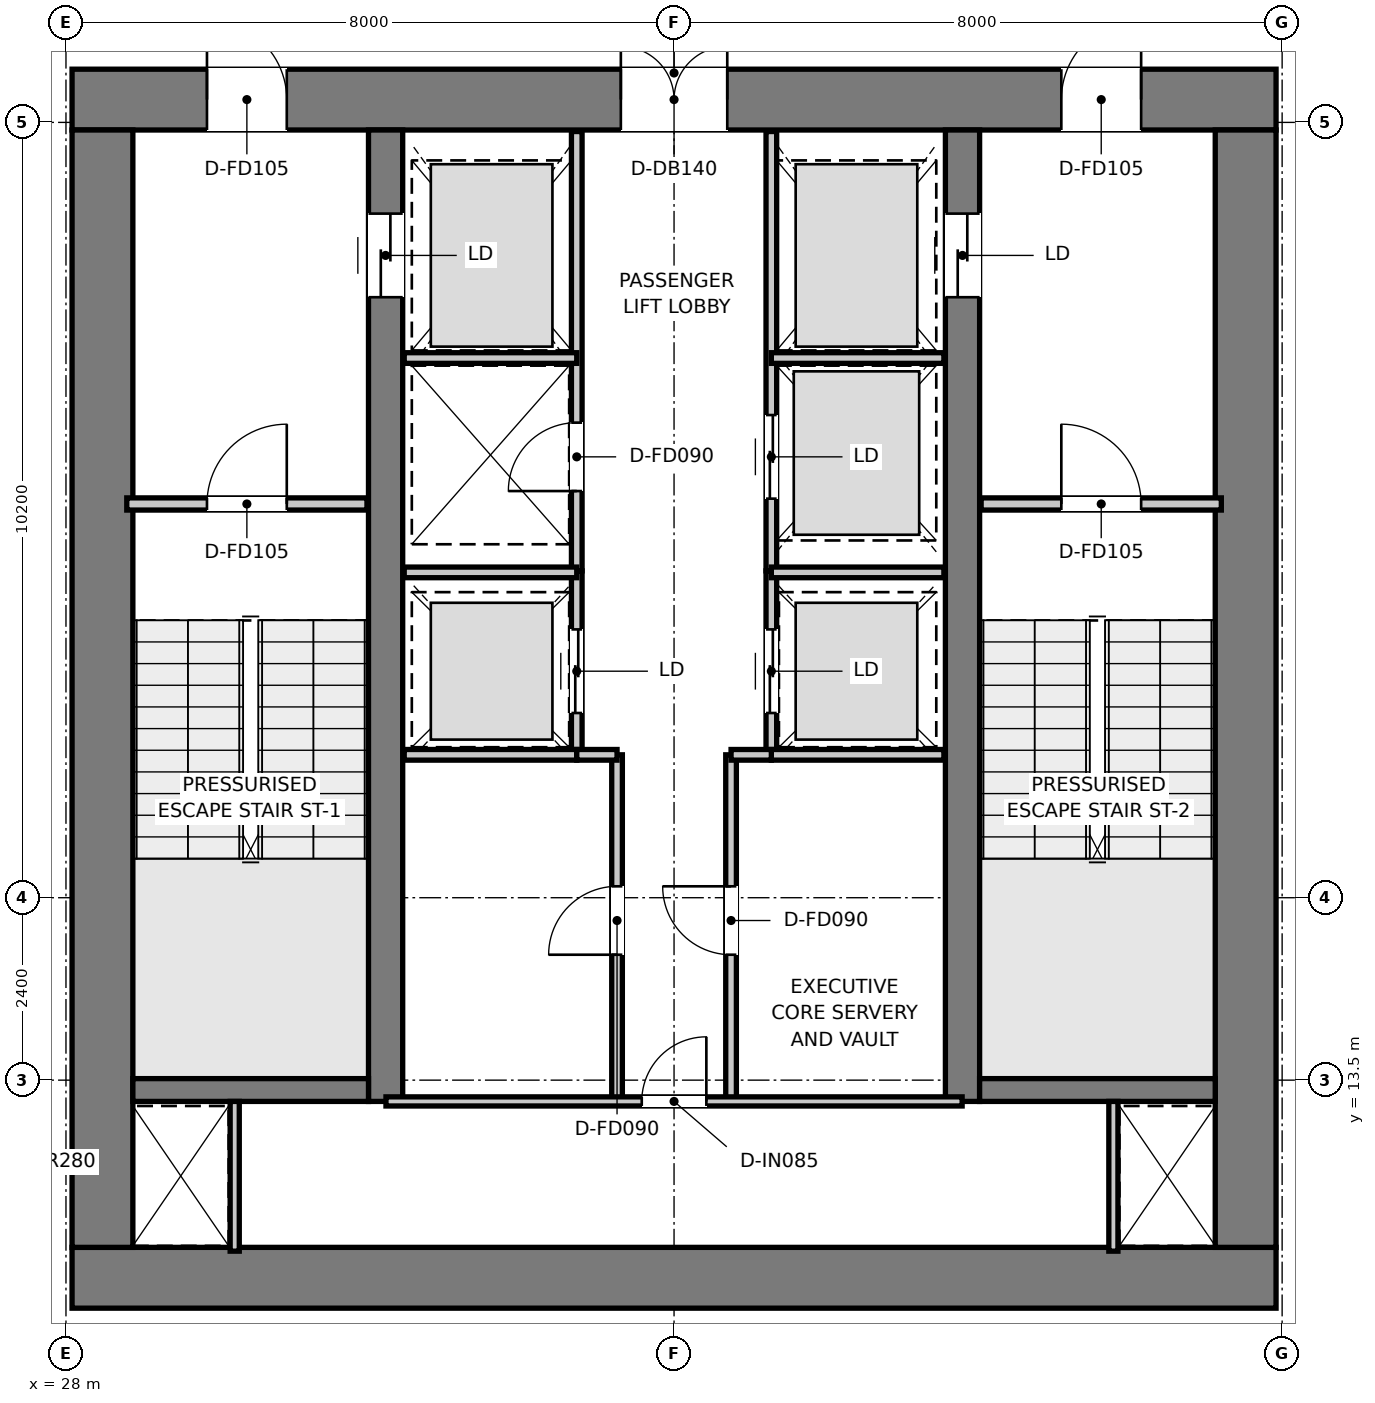
"""IFC4 building model, lengths in metres.
Left out: names, types, materials, properties, quantities, classifications, styles, units other than length and angle.
Written with IfcOpenShell. Run it as: python <this file> out.ifc"""

import sys

from ifc_helpers import new_model, si_unit, direction, frame, frame_2d, origin, place, context, subcontext, project, spatial, rectangle, extrude, element, fill, save


model = new_model("IFC4")
c1 = context("Model", 3, precision=1e-05, world=origin(), true_north=direction((0.0, 1.0)))
c2 = subcontext(c1, "Body", "Model", "MODEL_VIEW")
j1 = project(units=[si_unit("LENGTHUNIT", "METRE"), si_unit("PLANEANGLEUNIT", "RADIAN")], contexts=[c1])
p1 = place(None, origin())
s1 = spatial("IfcSite", under=j1, at=p1, CompositionType="ELEMENT")
p2 = place(p1, origin())
s2 = spatial("IfcBuilding", under=s1, at=p2, CompositionType="ELEMENT")
p3 = place(p2, frame((0.0, 0.0, 275.3)))
s3 = spatial("IfcBuildingStorey", under=s2, at=p3, CompositionType="ELEMENT", Elevation=275.3)
p4 = place(p3, frame((28.08, 10.9, 0.0), z_axis=(0.0, 0.0, 1.0), x_axis=(1.0, 0.0, 0.0)))
e1 = element("IfcWall", 1, at=p4, inside=s3, PredefinedType="SHEAR", context=c2, shape_type="SweptSolid", body=[
    extrude(rectangle(XDim=15.84, YDim=0.8, at=frame_2d((7.92, 0.0))), origin(), (0.0, 0.0, 1.0), 3.95),
])
p5 = place(p3, frame((28.08, 26.4, 0.0), z_axis=(0.0, 0.0, 1.0), x_axis=(1.0, 0.0, 0.0)))
e2 = element("IfcWall", 2, at=p5, inside=s3, PredefinedType="SHEAR", context=c2, shape_type="SweptSolid", body=[
    extrude(rectangle(XDim=15.84, YDim=0.8, at=frame_2d((7.92, 0.0))), origin(), (0.0, 0.0, 1.0), 3.95),
])
p6 = place(p5, frame((7.22, 0.0, 0.0)))
e3 = element("IfcOpeningElement", 3, at=p6, cuts=e2, PredefinedType="OPENING", context=c2, shape_type="SweptSolid", body=[
    extrude(rectangle(XDim=1.4, YDim=2.2, at=frame_2d((0.7, 1.1))), frame((0.0, 0.41, 0.0), z_axis=(0.0, -1.0, 0.0), x_axis=(1.0, 0.0, 0.0)), (0.0, 0.0, 1.0), 0.82),
])
p7 = place(p5, frame((1.775, 0.0, 0.0)))
e4 = element("IfcOpeningElement", 4, at=p7, cuts=e2, PredefinedType="OPENING", context=c2, shape_type="SweptSolid", body=[
    extrude(rectangle(XDim=1.05, YDim=2.1, at=frame_2d((0.525, 1.05))), frame((0.0, 0.41, 0.0), z_axis=(0.0, -1.0, 0.0), x_axis=(1.0, 0.0, 0.0)), (0.0, 0.0, 1.0), 0.82),
])
p8 = place(p5, frame((13.015, 0.0, 0.0)))
e5 = element("IfcOpeningElement", 5, at=p8, cuts=e2, PredefinedType="OPENING", context=c2, shape_type="SweptSolid", body=[
    extrude(rectangle(XDim=1.05, YDim=2.1, at=frame_2d((0.525, 1.05))), frame((0.0, 0.41, 0.0), z_axis=(0.0, -1.0, 0.0), x_axis=(1.0, 0.0, 0.0)), (0.0, 0.0, 1.0), 0.82),
])
for number, where, z_axis, x_axis in (
    (6, (28.48, 11.3, 0.0), (0.0, 0.0, 1.0), (0.0, 1.0, 0.0)),
    (7, (43.52, 11.3, 0.0), (0.0, 0.0, 1.0), (0.0, 1.0, 0.0)),
):
    element("IfcWall", number, at=place(p3, frame(where, z_axis=z_axis, x_axis=x_axis)), inside=s3, PredefinedType="SHEAR", context=c2, shape_type="SweptSolid", body=[
        extrude(rectangle(XDim=14.7, YDim=0.8, at=frame_2d((7.35, 0.0))), origin(), (0.0, 0.0, 1.0), 3.95),
    ])
p9 = place(p3, frame((32.205, 13.22, 0.0), z_axis=(0.0, 0.0, 1.0), x_axis=(0.0, 1.0, 0.0)))
e8 = element("IfcWall", 8, at=p9, inside=s3, PredefinedType="SHEAR", context=c2, shape_type="SweptSolid", body=[
    extrude(rectangle(XDim=12.78, YDim=0.45, at=frame_2d((6.39, 0.0))), origin(), (0.0, 0.0, 1.0), 3.95),
])
p10 = place(p9, frame((10.58, 0.0, 0.0)))
e9 = element("IfcOpeningElement", 9, at=p10, cuts=e8, PredefinedType="OPENING", context=c2, shape_type="SweptSolid", body=[
    extrude(rectangle(XDim=1.1, YDim=2.15, at=frame_2d((0.55, 1.075))), frame((0.0, 0.235, 0.0), z_axis=(0.0, -1.0, 0.0), x_axis=(1.0, 0.0, 0.0)), (0.0, 0.0, 1.0), 0.47),
])
p11 = place(p3, frame((39.795, 13.22, 0.0), z_axis=(0.0, 0.0, 1.0), x_axis=(0.0, 1.0, 0.0)))
e10 = element("IfcWall", 10, at=p11, inside=s3, PredefinedType="SHEAR", context=c2, shape_type="SweptSolid", body=[
    extrude(rectangle(XDim=12.78, YDim=0.45, at=frame_2d((6.39, 0.0))), origin(), (0.0, 0.0, 1.0), 3.95),
])
p12 = place(p11, frame((10.58, 0.0, 0.0)))
e11 = element("IfcOpeningElement", 11, at=p12, cuts=e10, PredefinedType="OPENING", context=c2, shape_type="SweptSolid", body=[
    extrude(rectangle(XDim=1.1, YDim=2.15, at=frame_2d((0.55, 1.075))), frame((0.0, 0.235, 0.0), z_axis=(0.0, -1.0, 0.0), x_axis=(1.0, 0.0, 0.0)), (0.0, 0.0, 1.0), 0.47),
])
for number, where, z_axis, x_axis in (
    (12, (28.88, 13.37, 0.0), (0.0, 0.0, 1.0), (1.0, 0.0, 0.0)),
    (13, (40.02, 13.37, 0.0), (0.0, 0.0, 1.0), (1.0, 0.0, 0.0)),
):
    element("IfcWall", number, at=place(p3, frame(where, z_axis=z_axis, x_axis=x_axis)), inside=s3, PredefinedType="SHEAR", context=c2, shape_type="SweptSolid", body=[
        extrude(rectangle(XDim=3.1, YDim=0.3, at=frame_2d((1.55, 0.0))), origin(), (0.0, 0.0, 1.0), 3.95),
    ])
p13 = place(p3, frame((28.8, 21.08, 0.0), z_axis=(0.0, 0.0, 1.0), x_axis=(1.0, 0.0, 0.0)))
e14 = element("IfcWall", 14, at=p13, inside=s3, PredefinedType="PARTITIONING", context=c2, shape_type="SweptSolid", body=[
    extrude(rectangle(XDim=3.16, YDim=0.16, at=frame_2d((1.58, 0.0))), origin(), (0.0, 0.0, 1.0), 3.67),
])
p14 = place(p13, frame((1.055, 0.0, 0.0)))
e15 = element("IfcOpeningElement", 15, at=p14, cuts=e14, PredefinedType="OPENING", context=c2, shape_type="SweptSolid", body=[
    extrude(rectangle(XDim=1.05, YDim=2.1, at=frame_2d((0.525, 1.05))), frame((0.0, 0.09, 0.0), z_axis=(0.0, -1.0, 0.0), x_axis=(1.0, 0.0, 0.0)), (0.0, 0.0, 1.0), 0.18),
])
p15 = place(p3, frame((40.04, 21.08, 0.0), z_axis=(0.0, 0.0, 1.0), x_axis=(1.0, 0.0, 0.0)))
e16 = element("IfcWall", 16, at=p15, inside=s3, PredefinedType="PARTITIONING", context=c2, shape_type="SweptSolid", body=[
    extrude(rectangle(XDim=3.16, YDim=0.16, at=frame_2d((1.58, 0.0))), origin(), (0.0, 0.0, 1.0), 3.67),
])
p16 = place(p15, frame((1.055, 0.0, 0.0)))
e17 = element("IfcOpeningElement", 17, at=p16, cuts=e16, PredefinedType="OPENING", context=c2, shape_type="SweptSolid", body=[
    extrude(rectangle(XDim=1.05, YDim=2.1, at=frame_2d((0.525, 1.05))), frame((0.0, 0.09, 0.0), z_axis=(0.0, -1.0, 0.0), x_axis=(1.0, 0.0, 0.0)), (0.0, 0.0, 1.0), 0.18),
])
p17 = place(p3, frame((34.72, 20.2, 0.0), z_axis=(0.0, 0.0, 1.0), x_axis=(0.0, 1.0, 0.0)))
e18 = element("IfcWall", 18, at=p17, inside=s3, PredefinedType="PARTITIONING", context=c2, shape_type="SweptSolid", body=[
    extrude(rectangle(XDim=5.78, YDim=0.14, at=frame_2d((2.89, 0.0))), origin(), (0.0, 0.0, 1.0), 2.82),
])
p18 = place(p17, frame((1.05, 0.0, 0.0)))
e19 = element("IfcOpeningElement", 19, at=p18, cuts=e18, PredefinedType="OPENING", context=c2, shape_type="SweptSolid", body=[
    extrude(rectangle(XDim=0.9, YDim=2.1, at=frame_2d((0.45, 1.05))), frame((0.0, 0.08, 0.0), z_axis=(0.0, -1.0, 0.0), x_axis=(1.0, 0.0, 0.0)), (0.0, 0.0, 1.0), 0.16),
])
p19 = place(p3, frame((37.28, 20.2, 0.0), z_axis=(0.0, 0.0, 1.0), x_axis=(0.0, 1.0, 0.0)))
e20 = element("IfcWall", 20, at=p19, inside=s3, PredefinedType="PARTITIONING", context=c2, shape_type="SweptSolid", body=[
    extrude(rectangle(XDim=5.78, YDim=0.14, at=frame_2d((2.89, 0.0))), origin(), (0.0, 0.0, 1.0), 2.82),
])
p20 = place(p19, frame((0.95, 0.0, 0.0)))
e21 = element("IfcOpeningElement", 21, at=p20, cuts=e20, PredefinedType="OPENING", context=c2, shape_type="SweptSolid", body=[
    extrude(rectangle(XDim=1.1, YDim=2.15, at=frame_2d((0.55, 1.075))), frame((0.0, 0.08, 0.0), z_axis=(0.0, -1.0, 0.0), x_axis=(1.0, 0.0, 0.0)), (0.0, 0.0, 1.0), 0.16),
])
for number, where, z_axis, x_axis in (
    (22, (32.45, 23.0, 0.0), (0.0, 0.0, 1.0), (1.0, 0.0, 0.0)),
    (23, (37.28, 23.0, 0.0), (0.0, 0.0, 1.0), (1.0, 0.0, 0.0)),
):
    element("IfcWall", number, at=place(p3, frame(where, z_axis=z_axis, x_axis=x_axis)), inside=s3, PredefinedType="PARTITIONING", context=c2, shape_type="SweptSolid", body=[
        extrude(rectangle(XDim=2.27, YDim=0.14, at=frame_2d((1.135, 0.0))), origin(), (0.0, 0.0, 1.0), 2.82),
    ])
p21 = place(p3, frame((34.72, 17.78, 0.0), z_axis=(0.0, 0.0, 1.0), x_axis=(0.0, 1.0, 0.0)))
e24 = element("IfcWall", 24, at=p21, inside=s3, PredefinedType="PARTITIONING", context=c2, shape_type="SweptSolid", body=[
    extrude(rectangle(XDim=2.42, YDim=0.14, at=frame_2d((1.21, 0.0))), origin(), (0.0, 0.0, 1.0), 3.67),
])
p22 = place(p21, frame((0.55, 0.0, 0.0)))
e25 = element("IfcOpeningElement", 25, at=p22, cuts=e24, PredefinedType="OPENING", context=c2, shape_type="SweptSolid", body=[
    extrude(rectangle(XDim=1.1, YDim=2.15, at=frame_2d((0.55, 1.075))), frame((0.0, 0.08, 0.0), z_axis=(0.0, -1.0, 0.0), x_axis=(1.0, 0.0, 0.0)), (0.0, 0.0, 1.0), 0.16),
])
p23 = place(p3, frame((37.28, 17.78, 0.0), z_axis=(0.0, 0.0, 1.0), x_axis=(0.0, 1.0, 0.0)))
e26 = element("IfcWall", 26, at=p23, inside=s3, PredefinedType="PARTITIONING", context=c2, shape_type="SweptSolid", body=[
    extrude(rectangle(XDim=2.42, YDim=0.14, at=frame_2d((1.21, 0.0))), origin(), (0.0, 0.0, 1.0), 3.67),
])
p24 = place(p23, frame((0.55, 0.0, 0.0)))
e27 = element("IfcOpeningElement", 27, at=p24, cuts=e26, PredefinedType="OPENING", context=c2, shape_type="SweptSolid", body=[
    extrude(rectangle(XDim=1.1, YDim=2.15, at=frame_2d((0.55, 1.075))), frame((0.0, 0.08, 0.0), z_axis=(0.0, -1.0, 0.0), x_axis=(1.0, 0.0, 0.0)), (0.0, 0.0, 1.0), 0.16),
])
for number, where, z_axis, x_axis in (
    (28, (32.45, 17.78, 0.0), (0.0, 0.0, 1.0), (1.0, 0.0, 0.0)),
    (29, (32.45, 20.18, 0.0), (0.0, 0.0, 1.0), (1.0, 0.0, 0.0)),
    (30, (37.28, 17.78, 0.0), (0.0, 0.0, 1.0), (1.0, 0.0, 0.0)),
    (31, (37.28, 20.18, 0.0), (0.0, 0.0, 1.0), (1.0, 0.0, 0.0)),
):
    element("IfcWall", number, at=place(p3, frame(where, z_axis=z_axis, x_axis=x_axis)), inside=s3, PredefinedType="PARTITIONING", context=c2, shape_type="SweptSolid", body=[
        extrude(rectangle(XDim=2.27, YDim=0.14, at=frame_2d((1.135, 0.0))), origin(), (0.0, 0.0, 1.0), 3.67),
    ])
p25 = place(p3, frame((35.25, 13.22, 0.0), z_axis=(0.0, 0.0, 1.0), x_axis=(0.0, 1.0, 0.0)))
e32 = element("IfcWall", 32, at=p25, inside=s3, PredefinedType="PARTITIONING", context=c2, shape_type="SweptSolid", body=[
    extrude(rectangle(XDim=4.56, YDim=0.14, at=frame_2d((2.28, 0.0))), origin(), (0.0, 0.0, 1.0), 3.67),
])
p26 = place(p25, frame((1.93, 0.0, 0.0)))
e33 = element("IfcOpeningElement", 33, at=p26, cuts=e32, PredefinedType="OPENING", context=c2, shape_type="SweptSolid", body=[
    extrude(rectangle(XDim=0.9, YDim=2.1, at=frame_2d((0.45, 1.05))), frame((0.0, 0.08, 0.0), z_axis=(0.0, -1.0, 0.0), x_axis=(1.0, 0.0, 0.0)), (0.0, 0.0, 1.0), 0.16),
])
p27 = place(p3, frame((34.72, 17.78, 0.0), z_axis=(0.0, 0.0, 1.0), x_axis=(1.0, 0.0, 0.0)))
e34 = element("IfcWall", 34, at=p27, inside=s3, PredefinedType="PARTITIONING", context=c2, shape_type="SweptSolid", body=[
    extrude(rectangle(XDim=0.53, YDim=0.14, at=frame_2d((0.265, 0.0))), origin(), (0.0, 0.0, 1.0), 3.67),
])
p28 = place(p3, frame((36.75, 13.22, 0.0), z_axis=(0.0, 0.0, 1.0), x_axis=(0.0, 1.0, 0.0)))
e35 = element("IfcWall", 35, at=p28, inside=s3, PredefinedType="PARTITIONING", context=c2, shape_type="SweptSolid", body=[
    extrude(rectangle(XDim=4.56, YDim=0.14, at=frame_2d((2.28, 0.0))), origin(), (0.0, 0.0, 1.0), 3.67),
])
p29 = place(p28, frame((1.93, 0.0, 0.0)))
e36 = element("IfcOpeningElement", 36, at=p29, cuts=e35, PredefinedType="OPENING", context=c2, shape_type="SweptSolid", body=[
    extrude(rectangle(XDim=0.9, YDim=2.1, at=frame_2d((0.45, 1.05))), frame((0.0, 0.08, 0.0), z_axis=(0.0, -1.0, 0.0), x_axis=(1.0, 0.0, 0.0)), (0.0, 0.0, 1.0), 0.16),
])
p30 = place(p3, frame((36.75, 17.78, 0.0), z_axis=(0.0, 0.0, 1.0), x_axis=(1.0, 0.0, 0.0)))
e37 = element("IfcWall", 37, at=p30, inside=s3, PredefinedType="PARTITIONING", context=c2, shape_type="SweptSolid", body=[
    extrude(rectangle(XDim=0.53, YDim=0.14, at=frame_2d((0.265, 0.0))), origin(), (0.0, 0.0, 1.0), 3.67),
])
for number, where, z_axis, x_axis in (
    (38, (30.22, 11.25, 0.0), (0.0, 0.0, 1.0), (0.0, 1.0, 0.0)),
    (39, (41.78, 11.25, 0.0), (0.0, 0.0, 1.0), (0.0, 1.0, 0.0)),
):
    element("IfcWall", number, at=place(p3, frame(where, z_axis=z_axis, x_axis=x_axis)), inside=s3, PredefinedType="PARTITIONING", context=c2, shape_type="SweptSolid", body=[
        extrude(rectangle(XDim=1.97, YDim=0.12, at=frame_2d((0.985, 0.0))), origin(), (0.0, 0.0, 1.0), 3.67),
    ])
p31 = place(p3, frame((32.21, 13.22, 0.0), z_axis=(0.0, 0.0, 1.0), x_axis=(1.0, 0.0, 0.0)))
e40 = element("IfcWall", 40, at=p31, inside=s3, PredefinedType="PARTITIONING", context=c2, shape_type="SweptSolid", body=[
    extrude(rectangle(XDim=7.58, YDim=0.12, at=frame_2d((3.79, 0.0))), origin(), (0.0, 0.0, 1.0), 3.67),
])
p32 = place(p31, frame((3.365, 0.0, 0.0)))
e41 = element("IfcOpeningElement", 41, at=p32, cuts=e40, PredefinedType="OPENING", context=c2, shape_type="SweptSolid", body=[
    extrude(rectangle(XDim=0.85, YDim=2.1, at=frame_2d((0.425, 1.05))), frame((0.0, 0.07, 0.0), z_axis=(0.0, -1.0, 0.0), x_axis=(1.0, 0.0, 0.0)), (0.0, 0.0, 1.0), 0.14),
])
p33 = place(p14, origin())
e42 = element("IfcDoor", 42, at=p33, inside=s3, OperationType="SINGLE_SWING_RIGHT", PredefinedType="DOOR", context=c2, shape_type="SweptSolid", body=[
    extrude(rectangle(XDim=1.05, YDim=2.1, at=frame_2d((0.525, 1.05))), frame((0.0, 0.025, 0.0), z_axis=(0.0, -1.0, 0.0), x_axis=(1.0, 0.0, 0.0)), (0.0, 0.0, 1.0), 0.05),
])
fill(e15, e42)
p34 = place(p16, origin())
e43 = element("IfcDoor", 43, at=p34, inside=s3, OperationType="SINGLE_SWING_LEFT", PredefinedType="DOOR", context=c2, shape_type="SweptSolid", body=[
    extrude(rectangle(XDim=1.05, YDim=2.1, at=frame_2d((0.525, 1.05))), frame((0.0, 0.025, 0.0), z_axis=(0.0, -1.0, 0.0), x_axis=(1.0, 0.0, 0.0)), (0.0, 0.0, 1.0), 0.05),
])
fill(e17, e43)
p35 = place(p6, origin())
e44 = element("IfcDoor", 44, at=p35, inside=s3, OperationType="DOUBLE_DOOR_SINGLE_SWING", PredefinedType="DOOR", context=c2, shape_type="SweptSolid", body=[
    extrude(rectangle(XDim=1.4, YDim=2.2, at=frame_2d((0.7, 1.1))), frame((0.0, 0.025, 0.0), z_axis=(0.0, -1.0, 0.0), x_axis=(1.0, 0.0, 0.0)), (0.0, 0.0, 1.0), 0.05),
])
fill(e3, e44)
p36 = place(p7, origin())
e45 = element("IfcDoor", 45, at=p36, inside=s3, OperationType="SINGLE_SWING_LEFT", PredefinedType="DOOR", context=c2, shape_type="SweptSolid", body=[
    extrude(rectangle(XDim=1.05, YDim=2.1, at=frame_2d((0.525, 1.05))), frame((0.0, 0.025, 0.0), z_axis=(0.0, -1.0, 0.0), x_axis=(1.0, 0.0, 0.0)), (0.0, 0.0, 1.0), 0.05),
])
fill(e4, e45)
p37 = place(p8, origin())
e46 = element("IfcDoor", 46, at=p37, inside=s3, OperationType="SINGLE_SWING_RIGHT", PredefinedType="DOOR", context=c2, shape_type="SweptSolid", body=[
    extrude(rectangle(XDim=1.05, YDim=2.1, at=frame_2d((0.525, 1.05))), frame((0.0, 0.025, 0.0), z_axis=(0.0, -1.0, 0.0), x_axis=(1.0, 0.0, 0.0)), (0.0, 0.0, 1.0), 0.05),
])
fill(e5, e46)
p38 = place(p10, origin())
e47 = element("IfcDoor", 47, at=p38, inside=s3, OperationType="DOUBLE_DOOR_SLIDING", PredefinedType="DOOR", context=c2, shape_type="SweptSolid", body=[
    extrude(rectangle(XDim=1.1, YDim=2.15, at=frame_2d((0.55, 1.075))), frame((0.0, 0.025, 0.0), z_axis=(0.0, -1.0, 0.0), x_axis=(1.0, 0.0, 0.0)), (0.0, 0.0, 1.0), 0.05),
])
fill(e9, e47)
p39 = place(p12, origin())
e48 = element("IfcDoor", 48, at=p39, inside=s3, OperationType="DOUBLE_DOOR_SLIDING", PredefinedType="DOOR", context=c2, shape_type="SweptSolid", body=[
    extrude(rectangle(XDim=1.1, YDim=2.15, at=frame_2d((0.55, 1.075))), frame((0.0, 0.025, 0.0), z_axis=(0.0, -1.0, 0.0), x_axis=(1.0, 0.0, 0.0)), (0.0, 0.0, 1.0), 0.05),
])
fill(e11, e48)
p40 = place(p18, origin())
e49 = element("IfcDoor", 49, at=p40, inside=s3, OperationType="SINGLE_SWING_LEFT", PredefinedType="DOOR", context=c2, shape_type="SweptSolid", body=[
    extrude(rectangle(XDim=0.9, YDim=2.1, at=frame_2d((0.45, 1.05))), frame((0.0, 0.025, 0.0), z_axis=(0.0, -1.0, 0.0), x_axis=(1.0, 0.0, 0.0)), (0.0, 0.0, 1.0), 0.05),
])
fill(e19, e49)
p41 = place(p20, origin())
e50 = element("IfcDoor", 50, at=p41, inside=s3, OperationType="DOUBLE_DOOR_SLIDING", PredefinedType="DOOR", context=c2, shape_type="SweptSolid", body=[
    extrude(rectangle(XDim=1.1, YDim=2.15, at=frame_2d((0.55, 1.075))), frame((0.0, 0.025, 0.0), z_axis=(0.0, -1.0, 0.0), x_axis=(1.0, 0.0, 0.0)), (0.0, 0.0, 1.0), 0.05),
])
fill(e21, e50)
p42 = place(p22, origin())
e51 = element("IfcDoor", 51, at=p42, inside=s3, OperationType="DOUBLE_DOOR_SLIDING", PredefinedType="DOOR", context=c2, shape_type="SweptSolid", body=[
    extrude(rectangle(XDim=1.1, YDim=2.15, at=frame_2d((0.55, 1.075))), frame((0.0, 0.025, 0.0), z_axis=(0.0, -1.0, 0.0), x_axis=(1.0, 0.0, 0.0)), (0.0, 0.0, 1.0), 0.05),
])
fill(e25, e51)
p43 = place(p24, origin())
e52 = element("IfcDoor", 52, at=p43, inside=s3, OperationType="DOUBLE_DOOR_SLIDING", PredefinedType="DOOR", context=c2, shape_type="SweptSolid", body=[
    extrude(rectangle(XDim=1.1, YDim=2.15, at=frame_2d((0.55, 1.075))), frame((0.0, 0.025, 0.0), z_axis=(0.0, -1.0, 0.0), x_axis=(1.0, 0.0, 0.0)), (0.0, 0.0, 1.0), 0.05),
])
fill(e27, e52)
p44 = place(p26, origin())
e53 = element("IfcDoor", 53, at=p44, inside=s3, OperationType="SINGLE_SWING_LEFT", PredefinedType="DOOR", context=c2, shape_type="SweptSolid", body=[
    extrude(rectangle(XDim=0.9, YDim=2.1, at=frame_2d((0.45, 1.05))), frame((0.0, 0.025, 0.0), z_axis=(0.0, -1.0, 0.0), x_axis=(1.0, 0.0, 0.0)), (0.0, 0.0, 1.0), 0.05),
])
fill(e33, e53)
p45 = place(p29, origin())
e54 = element("IfcDoor", 54, at=p45, inside=s3, OperationType="SINGLE_SWING_RIGHT", PredefinedType="DOOR", context=c2, shape_type="SweptSolid", body=[
    extrude(rectangle(XDim=0.9, YDim=2.1, at=frame_2d((0.45, 1.05))), frame((0.0, 0.025, 0.0), z_axis=(0.0, -1.0, 0.0), x_axis=(1.0, 0.0, 0.0)), (0.0, 0.0, 1.0), 0.05),
])
fill(e36, e54)
p46 = place(p32, origin())
e55 = element("IfcDoor", 55, at=p46, inside=s3, OperationType="SINGLE_SWING_RIGHT", PredefinedType="DOOR", context=c2, shape_type="SweptSolid", body=[
    extrude(rectangle(XDim=0.85, YDim=2.1, at=frame_2d((0.425, 1.05))), frame((0.0, 0.025, 0.0), z_axis=(0.0, -1.0, 0.0), x_axis=(1.0, 0.0, 0.0)), (0.0, 0.0, 1.0), 0.05),
])
fill(e41, e55)
save(model, sys.argv[1])
